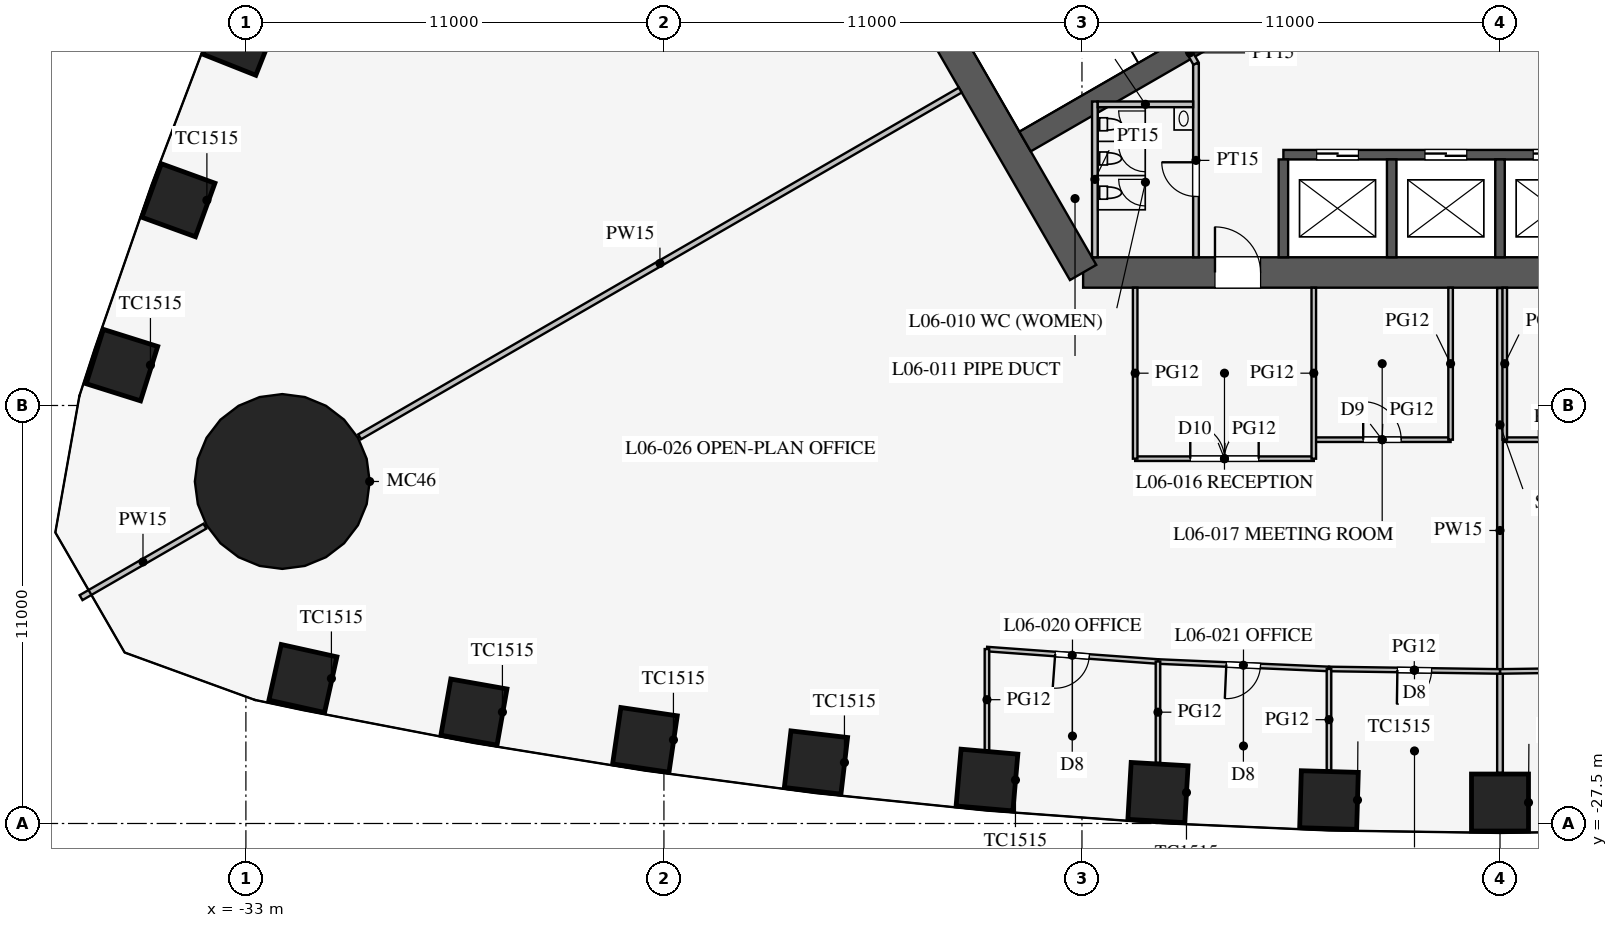
"""IFC4 building model, lengths in metres.
Left out: names, types, materials, properties, quantities, classifications, styles, units other than length and angle.
Written with IfcOpenShell. Run it as: python <this file> out.ifc"""

import sys

from ifc_helpers import new_model, si_unit, direction, frame, frame_2d, origin, origin_2d, place, context, subcontext, project, spatial, rectangle, circle, extrude, element, fill, save


model = new_model("IFC4")
c1 = context("Model", 3, precision=1e-05, world=origin(), true_north=direction((0.0, 1.0)))
c2 = subcontext(c1, "Body", "Model", "MODEL_VIEW")
j1 = project(units=[si_unit("LENGTHUNIT", "METRE"), si_unit("PLANEANGLEUNIT", "RADIAN")], contexts=[c1])
p1 = place(None, origin())
s1 = spatial("IfcSite", under=j1, at=p1, CompositionType="ELEMENT")
p2 = place(p1, origin())
s2 = spatial("IfcBuilding", under=s1, at=p2, CompositionType="ELEMENT")
p3 = place(p2, frame((0.0, 0.0, 29.1)))
s3 = spatial("IfcBuildingStorey", under=s2, at=p3, CompositionType="ELEMENT", Elevation=29.1)
for number, where, z_axis, x_axis in (
    (1, (-31.5, -23.685, 0.0), (0.0, 0.0, 1.0), (0.976, -0.217, 0.0)),
    (2, (-27.0, -24.568, 0.0), (0.0, 0.0, 1.0), (0.985, -0.174, 0.0)),
    (3, (-22.5, -25.299, 0.0), (0.0, 0.0, 1.0), (0.989, -0.145, 0.0)),
    (4, (-18.0, -25.895, 0.0), (0.0, 0.0, 1.0), (0.993, -0.116, 0.0)),
    (5, (-13.5, -26.357, 0.0), (0.0, 0.0, 1.0), (0.996, -0.087, 0.0)),
    (6, (-9.0, -26.686, 0.0), (0.0, 0.0, 1.0), (0.998, -0.058, 0.0)),
    (7, (-4.5, -26.883, 0.0), (0.0, 0.0, 1.0), (1.0, -0.029, 0.0)),
    (8, (0.0, -26.949, 0.0), (0.0, 0.0, 1.0), (1.0, 0.0, 0.0)),
    (9, (-33.16, -6.836, 0.0), (0.0, 0.0, 1.0), (-0.369, -0.929, 0.0)),
    (10, (-34.776, -11.099, 0.0), (0.0, 0.0, 1.0), (-0.342, -0.94, 0.0)),
    (11, (-36.262, -15.438, 0.0), (0.0, 0.0, 1.0), (-0.3, -0.954, 0.0)),
):
    element("IfcColumn", number, at=place(p3, frame(where, z_axis=z_axis, x_axis=x_axis)), inside=s3, PredefinedType="COLUMN", context=c2, shape_type="SweptSolid", body=[
        extrude(rectangle(XDim=1.5, YDim=1.5, at=origin_2d()), origin(), (0.0, 0.0, 1.0), 4.2),
    ])
p4 = place(p3, frame((-32.043, -18.5, 0.0), z_axis=(0.0, 0.0, 1.0), x_axis=(1.0, 0.0, 0.0)))
e12 = element("IfcColumn", 12, at=p4, inside=s3, PredefinedType="COLUMN", context=c2, shape_type="SweptSolid", body=[
    extrude(circle(Radius=2.3, at=origin_2d()), origin(), (0.0, 0.0, 1.0), 4.2),
])
p5 = place(p3, frame((-10.97, -13.0, 0.0), z_axis=(0.0, 0.0, 1.0), x_axis=(1.0, 0.0, 0.0)))
e13 = element("IfcWall", 13, at=p5, inside=s3, PredefinedType="SHEAR", context=c2, shape_type="SweptSolid", body=[
    extrude(rectangle(XDim=21.939, YDim=0.8, at=frame_2d((10.97, 0.0))), origin(), (0.0, 0.0, 1.0), 4.2),
])
p6 = place(p5, frame((17.27, 0.0, 0.0)))
e14 = element("IfcOpeningElement", 14, at=p6, cuts=e13, PredefinedType="OPENING", context=c2, shape_type="SweptSolid", body=[
    extrude(rectangle(XDim=1.2, YDim=2.1, at=frame_2d((0.6, 1.05))), frame((0.0, 0.41, 0.0), z_axis=(0.0, -1.0, 0.0), x_axis=(1.0, 0.0, 0.0)), (0.0, 0.0, 1.0), 0.82),
])
p7 = place(p5, frame((3.47, 0.0, 0.0)))
e15 = element("IfcOpeningElement", 15, at=p7, cuts=e13, PredefinedType="OPENING", context=c2, shape_type="SweptSolid", body=[
    extrude(rectangle(XDim=1.2, YDim=2.1, at=frame_2d((0.6, 1.05))), frame((0.0, 0.41, 0.0), z_axis=(0.0, -1.0, 0.0), x_axis=(1.0, 0.0, 0.0)), (0.0, 0.0, 1.0), 0.82),
])
p8 = place(p3, frame((-16.743, -3.0, 0.0), z_axis=(0.0, 0.0, 1.0), x_axis=(0.499995765644, -0.866027848477, 0.0)))
e16 = element("IfcWall", 16, at=p8, inside=s3, PredefinedType="SHEAR", context=c2, shape_type="SweptSolid", body=[
    extrude(rectangle(XDim=11.547, YDim=0.8, at=frame_2d((5.773, 0.0))), origin(), (0.0, 0.0, 1.0), 4.2),
])
p9 = place(p3, frame((-5.7, -9.9, 0.0), z_axis=(0.0, 0.0, 1.0), x_axis=(1.0, 0.0, 0.0)))
e17 = element("IfcWall", 17, at=p9, inside=s3, PredefinedType="SHEAR", context=c2, shape_type="SweptSolid", body=[
    extrude(rectangle(XDim=11.4, YDim=0.25, at=frame_2d((5.7, 0.0))), origin(), (0.0, 0.0, 1.0), 4.2),
])
p10 = place(p9, frame((0.875, 0.0, 0.0)))
e18 = element("IfcOpeningElement", 18, at=p10, cuts=e17, PredefinedType="OPENING", context=c2, shape_type="SweptSolid", body=[
    extrude(rectangle(XDim=1.1, YDim=2.2, at=frame_2d((0.55, 1.1))), frame((0.0, 0.135, 0.0), z_axis=(0.0, -1.0, 0.0), x_axis=(1.0, 0.0, 0.0)), (0.0, 0.0, 1.0), 0.27),
])
p11 = place(p9, frame((3.725, 0.0, 0.0)))
e19 = element("IfcOpeningElement", 19, at=p11, cuts=e17, PredefinedType="OPENING", context=c2, shape_type="SweptSolid", body=[
    extrude(rectangle(XDim=1.1, YDim=2.2, at=frame_2d((0.55, 1.1))), frame((0.0, 0.135, 0.0), z_axis=(0.0, -1.0, 0.0), x_axis=(1.0, 0.0, 0.0)), (0.0, 0.0, 1.0), 0.27),
])
p12 = place(p9, frame((6.575, 0.0, 0.0)))
e20 = element("IfcOpeningElement", 20, at=p12, cuts=e17, PredefinedType="OPENING", context=c2, shape_type="SweptSolid", body=[
    extrude(rectangle(XDim=1.1, YDim=2.2, at=frame_2d((0.55, 1.1))), frame((0.0, 0.135, 0.0), z_axis=(0.0, -1.0, 0.0), x_axis=(1.0, 0.0, 0.0)), (0.0, 0.0, 1.0), 0.27),
])
p13 = place(p9, frame((9.425, 0.0, 0.0)))
e21 = element("IfcOpeningElement", 21, at=p13, cuts=e17, PredefinedType="OPENING", context=c2, shape_type="SweptSolid", body=[
    extrude(rectangle(XDim=1.1, YDim=2.2, at=frame_2d((0.55, 1.1))), frame((0.0, 0.135, 0.0), z_axis=(0.0, -1.0, 0.0), x_axis=(1.0, 0.0, 0.0)), (0.0, 0.0, 1.0), 0.27),
])
for number, where, z_axis, x_axis in (
    (22, (-5.7, -10.025, 0.0), (0.0, 0.0, 1.0), (0.0, -1.0, 0.0)),
    (23, (-2.85, -10.025, 0.0), (0.0, 0.0, 1.0), (0.0, -1.0, 0.0)),
    (24, (0.0, -10.025, 0.0), (0.0, 0.0, 1.0), (0.0, -1.0, 0.0)),
):
    element("IfcWall", number, at=place(p3, frame(where, z_axis=z_axis, x_axis=x_axis)), inside=s3, PredefinedType="SHEAR", context=c2, shape_type="SweptSolid", body=[
        extrude(rectangle(XDim=2.575, YDim=0.25, at=frame_2d((1.288, 0.0))), origin(), (0.0, 0.0, 1.0), 4.2),
    ])
p14 = place(p3, frame((-4.638, -5.016, 0.0), z_axis=(0.0, 0.0, 1.0), x_axis=(-0.866019375473, -0.500010441196, 0.0)))
e25 = element("IfcWall", 25, at=p14, inside=s3, PredefinedType="SHEAR", context=c2, shape_type="SweptSolid", body=[
    extrude(rectangle(XDim=9.075, YDim=0.6, at=frame_2d((4.538, 0.0))), origin(), (0.0, 0.0, 1.0), 4.2),
])
p15 = place(p3, frame((-8.0, -7.5, 0.0), z_axis=(0.0, 0.0, 1.0), x_axis=(0.0, -1.0, 0.0)))
e26 = element("IfcWall", 26, at=p15, inside=s3, PredefinedType="PARTITIONING", context=c2, shape_type="SweptSolid", body=[
    extrude(rectangle(XDim=5.1, YDim=0.15, at=frame_2d((2.55, 0.0))), origin(), (0.0, 0.0, 1.0), 4.0),
])
p16 = place(p15, frame((2.6, 0.0, 0.0)))
e27 = element("IfcOpeningElement", 27, at=p16, cuts=e26, PredefinedType="OPENING", context=c2, shape_type="SweptSolid", body=[
    extrude(rectangle(XDim=0.9, YDim=2.1, at=frame_2d((0.45, 1.05))), frame((0.0, 0.085, 0.0), z_axis=(0.0, -1.0, 0.0), x_axis=(1.0, 0.0, 0.0)), (0.0, 0.0, 1.0), 0.17),
])
p17 = place(p3, frame((-8.0, -7.5, 0.0), z_axis=(0.0, 0.0, 1.0), x_axis=(-0.499842556608, 0.866116284689, 0.0)))
e28 = element("IfcWall", 28, at=p17, inside=s3, PredefinedType="PARTITIONING", context=c2, shape_type="SweptSolid", body=[
    extrude(rectangle(XDim=0.645, YDim=0.15, at=frame_2d((0.323, 0.0))), origin(), (0.0, 0.0, 1.0), 4.0),
])
p18 = place(p3, frame((-10.66, -8.5, 0.0), z_axis=(0.0, 0.0, 1.0), x_axis=(0.0, -1.0, 0.0)))
e29 = element("IfcWall", 29, at=p18, inside=s3, PredefinedType="PARTITIONING", context=c2, shape_type="SweptSolid", body=[
    extrude(rectangle(XDim=4.1, YDim=0.15, at=frame_2d((2.05, 0.0))), origin(), (0.0, 0.0, 1.0), 4.0),
])
p19 = place(p3, frame((-8.075, -8.575, 0.0), z_axis=(0.0, 0.0, 1.0), x_axis=(-1.0, 0.0, 0.0)))
e30 = element("IfcWall", 30, at=p19, inside=s3, PredefinedType="PARTITIONING", context=c2, shape_type="SweptSolid", body=[
    extrude(rectangle(XDim=2.51, YDim=0.15, at=frame_2d((1.255, 0.0))), origin(), (0.0, 0.0, 1.0), 4.0),
])
p20 = place(p3, frame((-14.203, -8.2, 0.0), z_axis=(0.0, 0.0, 1.0), x_axis=(-0.866024965723, -0.500000758745, 0.0)))
e31 = element("IfcWall", 31, at=p20, inside=s3, PredefinedType="PARTITIONING", context=c2, shape_type="SweptSolid", body=[
    extrude(rectangle(XDim=18.25, YDim=0.15, at=frame_2d((9.125, 0.0))), origin(), (0.0, 0.0, 1.0), 2.3),
])
p21 = place(p3, frame((-34.078, -19.675, 0.0), z_axis=(0.0, 0.0, 1.0), x_axis=(-0.866019247219, -0.500010663332, 0.0)))
e32 = element("IfcWall", 32, at=p21, inside=s3, PredefinedType="PARTITIONING", context=c2, shape_type="SweptSolid", body=[
    extrude(rectangle(XDim=3.764, YDim=0.15, at=frame_2d((1.882, 0.0))), origin(), (0.0, 0.0, 1.0), 2.3),
])
p22 = place(p3, frame((0.0, -13.41, 0.0), z_axis=(0.0, 0.0, 1.0), x_axis=(0.0, -1.0, 0.0)))
e33 = element("IfcWall", 33, at=p22, inside=s3, PredefinedType="PARTITIONING", context=c2, shape_type="SweptSolid", body=[
    extrude(rectangle(XDim=12.759, YDim=0.15, at=frame_2d((6.379, 0.0))), origin(), (0.0, 0.0, 1.0), 3.2),
])
p23 = place(p3, frame((0.125, -17.4, 0.0), z_axis=(0.0, 0.0, 1.0), x_axis=(1.0, 0.0, 0.0)))
e34 = element("IfcWall", 34, at=p23, inside=s3, PredefinedType="PARTITIONING", context=c2, shape_type="SweptSolid", body=[
    extrude(rectangle(XDim=2.7, YDim=0.12, at=frame_2d((1.35, 0.0))), origin(), (0.0, 0.0, 1.0), 2.9),
])
p24 = place(p23, frame((0.9, 0.0, 0.15)))
e35 = element("IfcOpeningElement", 35, at=p24, cuts=e34, PredefinedType="OPENING", context=c2, shape_type="SweptSolid", body=[
    extrude(rectangle(XDim=0.9, YDim=2.1, at=frame_2d((0.45, 1.05))), frame((0.0, 0.07, 0.0), z_axis=(0.0, -1.0, 0.0), x_axis=(1.0, 0.0, 0.0)), (0.0, 0.0, 1.0), 0.14),
])
p25 = place(p3, frame((-4.9, -17.4, 0.0), z_axis=(0.0, 0.0, 1.0), x_axis=(1.0, 0.0, 0.0)))
e36 = element("IfcWall", 36, at=p25, inside=s3, PredefinedType="PARTITIONING", context=c2, shape_type="SweptSolid", body=[
    extrude(rectangle(XDim=3.6, YDim=0.12, at=frame_2d((1.8, 0.0))), origin(), (0.0, 0.0, 1.0), 2.9),
])
p26 = place(p25, frame((1.3, 0.0, 0.15)))
e37 = element("IfcOpeningElement", 37, at=p26, cuts=e36, PredefinedType="OPENING", context=c2, shape_type="SweptSolid", body=[
    extrude(rectangle(XDim=1.0, YDim=2.1, at=frame_2d((0.5, 1.05))), frame((0.0, 0.07, 0.0), z_axis=(0.0, -1.0, 0.0), x_axis=(1.0, 0.0, 0.0)), (0.0, 0.0, 1.0), 0.14),
])
p27 = place(p3, frame((-9.6, -17.9, 0.0), z_axis=(0.0, 0.0, 1.0), x_axis=(1.0, 0.0, 0.0)))
e38 = element("IfcWall", 38, at=p27, inside=s3, PredefinedType="PARTITIONING", context=c2, shape_type="SweptSolid", body=[
    extrude(rectangle(XDim=4.7, YDim=0.12, at=frame_2d((2.35, 0.0))), origin(), (0.0, 0.0, 1.0), 2.9),
])
p28 = place(p27, frame((1.45, 0.0, 0.15)))
e39 = element("IfcOpeningElement", 39, at=p28, cuts=e38, PredefinedType="OPENING", context=c2, shape_type="SweptSolid", body=[
    extrude(rectangle(XDim=1.8, YDim=2.1, at=frame_2d((0.9, 1.05))), frame((0.0, 0.07, 0.0), z_axis=(0.0, -1.0, 0.0), x_axis=(1.0, 0.0, 0.0)), (0.0, 0.0, 1.0), 0.14),
])
for number, where, z_axis, x_axis in (
    (40, (0.125, -13.4, 0.0), (0.0, 0.0, 1.0), (0.0, -1.0, 0.0)),
    (41, (-1.3, -13.4, 0.0), (0.0, 0.0, 1.0), (0.0, -1.0, 0.0)),
):
    element("IfcWall", number, at=place(p3, frame(where, z_axis=z_axis, x_axis=x_axis)), inside=s3, PredefinedType="PARTITIONING", context=c2, shape_type="SweptSolid", body=[
        extrude(rectangle(XDim=4.0, YDim=0.12, at=frame_2d((2.0, 0.0))), origin(), (0.0, 0.0, 1.0), 2.9),
    ])
for number, where, z_axis, x_axis in (
    (42, (-4.9, -13.4, 0.0), (0.0, 0.0, 1.0), (0.0, -1.0, 0.0)),
    (43, (-9.6, -13.4, 0.0), (0.0, 0.0, 1.0), (0.0, -1.0, 0.0)),
):
    element("IfcWall", number, at=place(p3, frame(where, z_axis=z_axis, x_axis=x_axis)), inside=s3, PredefinedType="PARTITIONING", context=c2, shape_type="SweptSolid", body=[
        extrude(rectangle(XDim=4.5, YDim=0.12, at=frame_2d((2.25, 0.0))), origin(), (0.0, 0.0, 1.0), 2.9),
    ])
p29 = place(p3, frame((0.0, -23.499, 0.0), z_axis=(0.0, 0.0, 1.0), x_axis=(0.999894311967, 0.014538393859, 0.0)))
e44 = element("IfcWall", 44, at=p29, inside=s3, PredefinedType="PARTITIONING", context=c2, shape_type="SweptSolid", body=[
    extrude(rectangle(XDim=4.5, YDim=0.12, at=frame_2d((2.25, 0.0))), origin(), (0.0, 0.0, 1.0), 2.9),
])
p30 = place(p29, frame((1.8, 0.0, 0.15)))
e45 = element("IfcOpeningElement", 45, at=p30, cuts=e44, PredefinedType="OPENING", context=c2, shape_type="SweptSolid", body=[
    extrude(rectangle(XDim=0.9, YDim=2.1, at=frame_2d((0.45, 1.05))), frame((0.0, 0.07, 0.0), z_axis=(0.0, -1.0, 0.0), x_axis=(1.0, 0.0, 0.0)), (0.0, 0.0, 1.0), 0.14),
])
p31 = place(p3, frame((-13.5, -22.91, 0.0), z_axis=(0.0, 0.0, 1.0), x_axis=(0.997363894896, -0.072562119306, 0.0)))
e46 = element("IfcWall", 46, at=p31, inside=s3, PredefinedType="PARTITIONING", context=c2, shape_type="SweptSolid", body=[
    extrude(rectangle(XDim=4.512, YDim=0.12, at=frame_2d((2.256, 0.0))), origin(), (0.0, 0.0, 1.0), 2.9),
])
p32 = place(p31, frame((1.8, 0.0, 0.15)))
e47 = element("IfcOpeningElement", 47, at=p32, cuts=e46, PredefinedType="OPENING", context=c2, shape_type="SweptSolid", body=[
    extrude(rectangle(XDim=0.9, YDim=2.1, at=frame_2d((0.45, 1.05))), frame((0.0, 0.07, 0.0), z_axis=(0.0, -1.0, 0.0), x_axis=(1.0, 0.0, 0.0)), (0.0, 0.0, 1.0), 0.14),
])
p33 = place(p3, frame((-4.5, -23.433, 0.0), z_axis=(0.0, 0.0, 1.0), x_axis=(0.999894311967, -0.014538393859, 0.0)))
e48 = element("IfcWall", 48, at=p33, inside=s3, PredefinedType="PARTITIONING", context=c2, shape_type="SweptSolid", body=[
    extrude(rectangle(XDim=4.5, YDim=0.12, at=frame_2d((2.25, 0.0))), origin(), (0.0, 0.0, 1.0), 2.9),
])
p34 = place(p33, frame((1.8, 0.0, 0.15)))
e49 = element("IfcOpeningElement", 49, at=p34, cuts=e48, PredefinedType="OPENING", context=c2, shape_type="SweptSolid", body=[
    extrude(rectangle(XDim=0.9, YDim=2.1, at=frame_2d((0.45, 1.05))), frame((0.0, 0.07, 0.0), z_axis=(0.0, -1.0, 0.0), x_axis=(1.0, 0.0, 0.0)), (0.0, 0.0, 1.0), 0.14),
])
p35 = place(p3, frame((-9.0, -23.237, 0.0), z_axis=(0.0, 0.0, 1.0), x_axis=(0.999052370647, -0.043524254212, 0.0)))
e50 = element("IfcWall", 50, at=p35, inside=s3, PredefinedType="PARTITIONING", context=c2, shape_type="SweptSolid", body=[
    extrude(rectangle(XDim=4.504, YDim=0.12, at=frame_2d((2.252, 0.0))), origin(), (0.0, 0.0, 1.0), 2.9),
])
p36 = place(p35, frame((1.8, 0.0, 0.15)))
e51 = element("IfcOpeningElement", 51, at=p36, cuts=e50, PredefinedType="OPENING", context=c2, shape_type="SweptSolid", body=[
    extrude(rectangle(XDim=0.9, YDim=2.1, at=frame_2d((0.45, 1.05))), frame((0.0, 0.07, 0.0), z_axis=(0.0, -1.0, 0.0), x_axis=(1.0, 0.0, 0.0)), (0.0, 0.0, 1.0), 0.14),
])
p37 = place(p3, frame((-13.5, -22.91, 0.0), z_axis=(0.0, 0.0, 1.0), x_axis=(0.0, -1.0, 0.0)))
e52 = element("IfcWall", 52, at=p37, inside=s3, PredefinedType="PARTITIONING", context=c2, shape_type="SweptSolid", body=[
    extrude(rectangle(XDim=2.664, YDim=0.12, at=frame_2d((1.332, 0.0))), origin(), (0.0, 0.0, 1.0), 2.9),
])
p38 = place(p3, frame((-4.5, -23.433, 0.0), z_axis=(0.0, 0.0, 1.0), x_axis=(0.0, -1.0, 0.0)))
e53 = element("IfcWall", 53, at=p38, inside=s3, PredefinedType="PARTITIONING", context=c2, shape_type="SweptSolid", body=[
    extrude(rectangle(XDim=2.669, YDim=0.12, at=frame_2d((1.335, 0.0))), origin(), (0.0, 0.0, 1.0), 2.9),
])
p39 = place(p3, frame((-9.0, -23.237, 0.0), z_axis=(0.0, 0.0, 1.0), x_axis=(0.0, -1.0, 0.0)))
e54 = element("IfcWall", 54, at=p39, inside=s3, PredefinedType="PARTITIONING", context=c2, shape_type="SweptSolid", body=[
    extrude(rectangle(XDim=2.667, YDim=0.12, at=frame_2d((1.334, 0.0))), origin(), (0.0, 0.0, 1.0), 2.9),
])
p40 = place(p16, frame((0.9, 0.0, 0.0), z_axis=(0.0, 0.0, 1.0), x_axis=(-1.0, 0.0, 0.0)))
e55 = element("IfcDoor", 55, at=p40, inside=s3, OperationType="SINGLE_SWING_RIGHT", PredefinedType="DOOR", context=c2, shape_type="SweptSolid", body=[
    extrude(rectangle(XDim=0.9, YDim=2.1, at=frame_2d((0.45, 1.05))), frame((0.0, 0.025, 0.0), z_axis=(0.0, -1.0, 0.0), x_axis=(1.0, 0.0, 0.0)), (0.0, 0.0, 1.0), 0.05),
])
fill(e27, e55)
p41 = place(p7, origin())
e56 = element("IfcDoor", 56, at=p41, inside=s3, OperationType="SINGLE_SWING_LEFT", PredefinedType="DOOR", context=c2, shape_type="SweptSolid", body=[
    extrude(rectangle(XDim=1.2, YDim=2.1, at=frame_2d((0.6, 1.05))), frame((0.0, 0.025, 0.0), z_axis=(0.0, -1.0, 0.0), x_axis=(1.0, 0.0, 0.0)), (0.0, 0.0, 1.0), 0.05),
])
fill(e15, e56)
p42 = place(p28, origin())
e57 = element("IfcDoor", 57, at=p42, inside=s3, OperationType="DOUBLE_DOOR_SINGLE_SWING", PredefinedType="DOOR", context=c2, shape_type="SweptSolid", body=[
    extrude(rectangle(XDim=1.8, YDim=2.1, at=frame_2d((0.9, 1.05))), frame((0.0, 0.025, 0.0), z_axis=(0.0, -1.0, 0.0), x_axis=(1.0, 0.0, 0.0)), (0.0, 0.0, 1.0), 0.05),
])
fill(e39, e57)
p43 = place(p26, origin())
e58 = element("IfcDoor", 58, at=p43, inside=s3, OperationType="SINGLE_SWING_LEFT", PredefinedType="DOOR", context=c2, shape_type="SweptSolid", body=[
    extrude(rectangle(XDim=1.0, YDim=2.1, at=frame_2d((0.5, 1.05))), frame((0.0, 0.025, 0.0), z_axis=(0.0, -1.0, 0.0), x_axis=(1.0, 0.0, 0.0)), (0.0, 0.0, 1.0), 0.05),
])
fill(e37, e58)
p44 = place(p32, frame((0.9, 0.0, 0.0), z_axis=(0.0, 0.0, 1.0), x_axis=(-1.0, 0.0, 0.0)))
e59 = element("IfcDoor", 59, at=p44, inside=s3, OperationType="SINGLE_SWING_RIGHT", PredefinedType="DOOR", context=c2, shape_type="SweptSolid", body=[
    extrude(rectangle(XDim=0.9, YDim=2.1, at=frame_2d((0.45, 1.05))), frame((0.0, 0.025, 0.0), z_axis=(0.0, -1.0, 0.0), x_axis=(1.0, 0.0, 0.0)), (0.0, 0.0, 1.0), 0.05),
])
fill(e47, e59)
p45 = place(p36, frame((0.9, 0.0, 0.0), z_axis=(0.0, 0.0, 1.0), x_axis=(-1.0, 0.0, 0.0)))
e60 = element("IfcDoor", 60, at=p45, inside=s3, OperationType="SINGLE_SWING_RIGHT", PredefinedType="DOOR", context=c2, shape_type="SweptSolid", body=[
    extrude(rectangle(XDim=0.9, YDim=2.1, at=frame_2d((0.45, 1.05))), frame((0.0, 0.025, 0.0), z_axis=(0.0, -1.0, 0.0), x_axis=(1.0, 0.0, 0.0)), (0.0, 0.0, 1.0), 0.05),
])
fill(e51, e60)
p46 = place(p34, frame((0.9, 0.0, 0.0), z_axis=(0.0, 0.0, 1.0), x_axis=(-1.0, 0.0, 0.0)))
e61 = element("IfcDoor", 61, at=p46, inside=s3, OperationType="SINGLE_SWING_RIGHT", PredefinedType="DOOR", context=c2, shape_type="SweptSolid", body=[
    extrude(rectangle(XDim=0.9, YDim=2.1, at=frame_2d((0.45, 1.05))), frame((0.0, 0.025, 0.0), z_axis=(0.0, -1.0, 0.0), x_axis=(1.0, 0.0, 0.0)), (0.0, 0.0, 1.0), 0.05),
])
fill(e49, e61)
p47 = place(p10, origin())
e62 = element("IfcDoor", 62, at=p47, inside=s3, OperationType="DOUBLE_DOOR_SLIDING", PredefinedType="DOOR", context=c2, shape_type="SweptSolid", body=[
    extrude(rectangle(XDim=1.1, YDim=2.2, at=frame_2d((0.55, 1.1))), frame((0.0, 0.025, 0.0), z_axis=(0.0, -1.0, 0.0), x_axis=(1.0, 0.0, 0.0)), (0.0, 0.0, 1.0), 0.05),
])
fill(e18, e62)
p48 = place(p11, origin())
e63 = element("IfcDoor", 63, at=p48, inside=s3, OperationType="DOUBLE_DOOR_SLIDING", PredefinedType="DOOR", context=c2, shape_type="SweptSolid", body=[
    extrude(rectangle(XDim=1.1, YDim=2.2, at=frame_2d((0.55, 1.1))), frame((0.0, 0.025, 0.0), z_axis=(0.0, -1.0, 0.0), x_axis=(1.0, 0.0, 0.0)), (0.0, 0.0, 1.0), 0.05),
])
fill(e19, e63)
p49 = place(p12, origin())
e64 = element("IfcDoor", 64, at=p49, inside=s3, OperationType="DOUBLE_DOOR_SLIDING", PredefinedType="DOOR", context=c2, shape_type="SweptSolid", body=[
    extrude(rectangle(XDim=1.1, YDim=2.2, at=frame_2d((0.55, 1.1))), frame((0.0, 0.025, 0.0), z_axis=(0.0, -1.0, 0.0), x_axis=(1.0, 0.0, 0.0)), (0.0, 0.0, 1.0), 0.05),
])
fill(e20, e64)
save(model, sys.argv[1])
